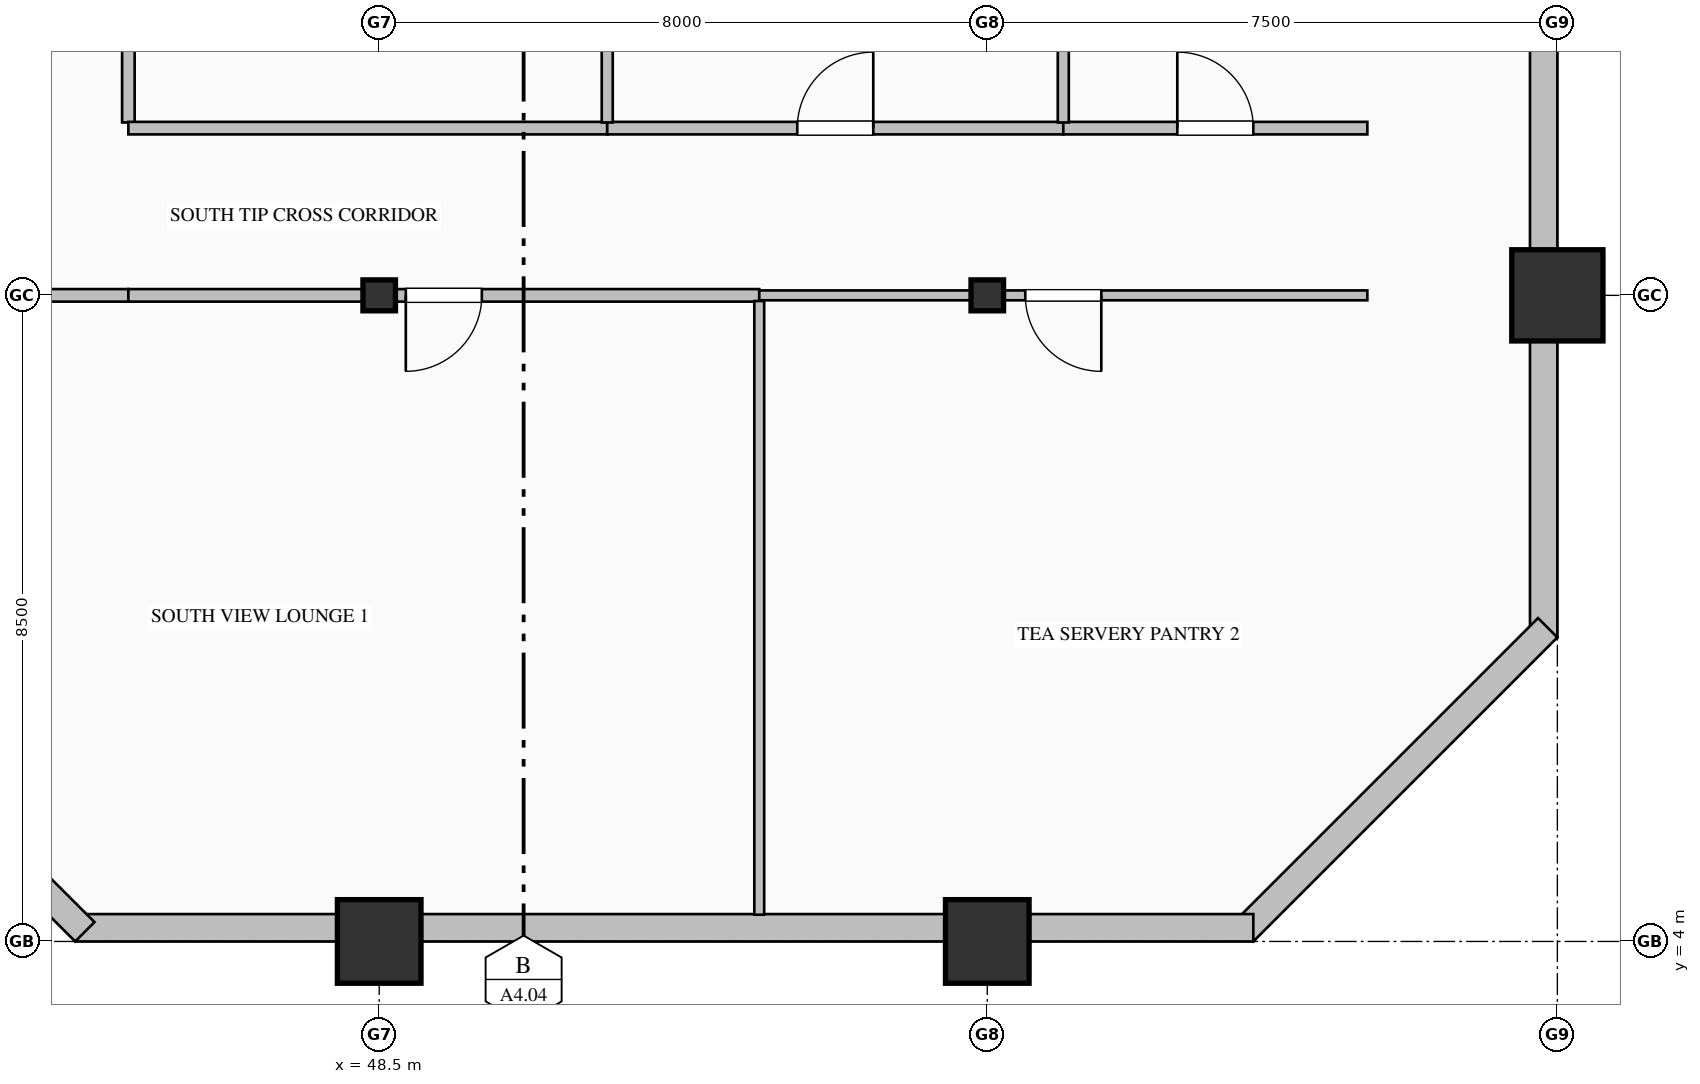
"""IFC4 building model, lengths in metres.
Left out: names, types, materials, properties, quantities, classifications, styles, units other than length and angle.
Written with IfcOpenShell. Run it as: python <this file> out.ifc"""

import sys

from ifc_helpers import new_model, si_unit, direction, frame, frame_2d, origin, origin_2d, place, context, subcontext, project, spatial, rectangle, hollow_rectangle, hollow_circle, i_section, extrude, element, fill, save


model = new_model("IFC4")
c1 = context("Model", 3, precision=1e-05, world=origin(), true_north=direction((0.0, 1.0)))
c2 = subcontext(c1, "Body", "Model", "MODEL_VIEW")
j1 = project(units=[si_unit("LENGTHUNIT", "METRE"), si_unit("PLANEANGLEUNIT", "RADIAN")], contexts=[c1])
p1 = place(None, origin())
s1 = spatial("IfcSite", under=j1, at=p1, CompositionType="ELEMENT")
p2 = place(p1, origin())
s2 = spatial("IfcBuilding", under=s1, at=p2, CompositionType="ELEMENT")
p3 = place(p2, frame((0.0, 0.0, 76.2)))
s3 = spatial("IfcBuildingStorey", under=s2, at=p3, CompositionType="ELEMENT", Elevation=76.2)
p4 = place(p3, frame((48.5, 4.0, 0.0), z_axis=(0.0, 0.0, 1.0), x_axis=(1.0, 0.0, 0.0)))
e1 = element("IfcColumn", 1, at=p4, inside=s3, PredefinedType="COLUMN", context=c2, shape_type="SweptSolid", body=[
    extrude(hollow_rectangle(XDim=1.1, YDim=1.1, WallThickness=0.04, at=origin_2d()), origin(), (0.0, 0.0, 1.0), 4.0),
])
p5 = place(p3, frame((48.5, 12.5, 0.0), z_axis=(0.0, 0.0, 1.0), x_axis=(1.0, 0.0, 0.0)))
e2 = element("IfcColumn", 2, at=p5, inside=s3, PredefinedType="COLUMN", context=c2, shape_type="SweptSolid", body=[
    extrude(i_section(OverallWidth=0.407, OverallDepth=0.428, WebThickness=0.02, FlangeThickness=0.035, FilletRadius=0.022, at=origin_2d()), origin(), (0.0, 0.0, 1.0), 4.0),
])
p6 = place(p3, frame((56.5, 4.0, 0.0), z_axis=(0.0, 0.0, 1.0), x_axis=(1.0, 0.0, 0.0)))
e3 = element("IfcColumn", 3, at=p6, inside=s3, PredefinedType="COLUMN", context=c2, shape_type="SweptSolid", body=[
    extrude(hollow_rectangle(XDim=1.1, YDim=1.1, WallThickness=0.04, at=origin_2d()), origin(), (0.0, 0.0, 1.0), 4.0),
])
p7 = place(p3, frame((56.5, 12.5, 0.0), z_axis=(0.0, 0.0, 1.0), x_axis=(1.0, 0.0, 0.0)))
e4 = element("IfcColumn", 4, at=p7, inside=s3, PredefinedType="COLUMN", context=c2, shape_type="SweptSolid", body=[
    extrude(i_section(OverallWidth=0.407, OverallDepth=0.428, WebThickness=0.02, FlangeThickness=0.035, FilletRadius=0.022, at=origin_2d()), origin(), (0.0, 0.0, 1.0), 4.0),
])
p8 = place(p3, frame((64.0, 12.5, 0.0), z_axis=(0.0, 0.0, 1.0), x_axis=(1.0, 0.0, 0.0)))
e5 = element("IfcColumn", 5, at=p8, inside=s3, PredefinedType="COLUMN", context=c2, shape_type="SweptSolid", body=[
    extrude(hollow_circle(Radius=0.6, WallThickness=0.04, at=origin_2d()), origin(), (0.0, 0.0, 1.0), 4.0),
])
p9 = place(p3, frame((63.82, 36.05, 0.0), z_axis=(0.0, 0.0, 1.0), x_axis=(0.0, -1.0, 0.0)))
e6 = element("IfcWall", 6, at=p9, inside=s3, PredefinedType="SOLIDWALL", context=c2, shape_type="SweptSolid", body=[
    extrude(rectangle(XDim=28.05, YDim=0.36, at=frame_2d((14.025, 0.0))), origin(), (0.0, 0.0, 1.0), 3.25),
])
p10 = place(p9, frame((2.7, 0.0, 0.85)))
e7 = element("IfcOpeningElement", 7, at=p10, cuts=e6, PredefinedType="OPENING", context=c2, shape_type="SweptSolid", body=[
    extrude(rectangle(XDim=1.8, YDim=2.05, at=frame_2d((0.9, 1.025))), frame((0.0, 0.19, 0.0), z_axis=(0.0, -1.0, 0.0), x_axis=(1.0, 0.0, 0.0)), (0.0, 0.0, 1.0), 0.38),
])
p11 = place(p9, frame((9.6, 0.0, 0.8)))
e8 = element("IfcOpeningElement", 8, at=p11, cuts=e6, PredefinedType="OPENING", context=c2, shape_type="SweptSolid", body=[
    extrude(rectangle(XDim=2.4, YDim=2.15, at=frame_2d((1.2, 1.075))), frame((0.0, 0.19, 0.0), z_axis=(0.0, -1.0, 0.0), x_axis=(1.0, 0.0, 0.0)), (0.0, 0.0, 1.0), 0.38),
])
p12 = place(p9, frame((13.5, 0.0, 0.85)))
e9 = element("IfcOpeningElement", 9, at=p12, cuts=e6, PredefinedType="OPENING", context=c2, shape_type="SweptSolid", body=[
    extrude(rectangle(XDim=1.8, YDim=2.05, at=frame_2d((0.9, 1.025))), frame((0.0, 0.19, 0.0), z_axis=(0.0, -1.0, 0.0), x_axis=(1.0, 0.0, 0.0)), (0.0, 0.0, 1.0), 0.38),
])
p13 = place(p3, frame((63.873, 8.127, 0.0), z_axis=(0.0, 0.0, 1.0), x_axis=(-0.707106781187, -0.707106781187, 0.0)))
e10 = element("IfcWall", 10, at=p13, inside=s3, PredefinedType="SOLIDWALL", context=c2, shape_type="SweptSolid", body=[
    extrude(rectangle(XDim=5.657, YDim=0.36, at=frame_2d((2.828, 0.0))), origin(), (0.0, 0.0, 1.0), 3.75),
])
p14 = place(p3, frame((60.0, 4.18, 0.0), z_axis=(0.0, 0.0, 1.0), x_axis=(-1.0, 0.0, 0.0)))
e11 = element("IfcWall", 11, at=p14, inside=s3, PredefinedType="SOLIDWALL", context=c2, shape_type="SweptSolid", body=[
    extrude(rectangle(XDim=15.5, YDim=0.36, at=frame_2d((7.75, 0.0))), origin(), (0.0, 0.0, 1.0), 3.25),
])
p15 = place(p3, frame((44.627, 4.127, 0.0), z_axis=(0.0, 0.0, 1.0), x_axis=(-0.707106781187, 0.707106781187, 0.0)))
e12 = element("IfcWall", 12, at=p15, inside=s3, PredefinedType="SOLIDWALL", context=c2, shape_type="SweptSolid", body=[
    extrude(rectangle(XDim=5.657, YDim=0.36, at=frame_2d((2.828, 0.0))), origin(), (0.0, 0.0, 1.0), 3.75),
])
p16 = place(p3, frame((45.2, 31.525, 0.0), z_axis=(0.0, 0.0, 1.0), x_axis=(0.0, -1.0, 0.0)))
e13 = element("IfcWall", 13, at=p16, inside=s3, PredefinedType="PARTITIONING", context=c2, shape_type="SweptSolid", body=[
    extrude(rectangle(XDim=16.751, YDim=0.165, at=frame_2d((8.375, 0.0))), origin(), (0.0, 0.0, 1.0), 3.75),
])
p17 = place(p16, frame((7.875, 0.0, 0.0)))
e14 = element("IfcOpeningElement", 14, at=p17, cuts=e13, PredefinedType="OPENING", context=c2, shape_type="SweptSolid", body=[
    extrude(rectangle(XDim=1.0, YDim=2.15, at=frame_2d((0.5, 1.075))), frame((0.0, 0.093, 0.0), z_axis=(0.0, -1.0, 0.0), x_axis=(1.0, 0.0, 0.0)), (0.0, 0.0, 1.0), 0.185),
])
p18 = place(p3, frame((45.2, 12.5, 0.0), z_axis=(0.0, 0.0, 1.0), x_axis=(-1.0, 0.0, 0.0)))
e15 = element("IfcWall", 15, at=p18, inside=s3, PredefinedType="PARTITIONING", context=c2, shape_type="SweptSolid", body=[
    extrude(rectangle(XDim=2.2, YDim=0.165, at=frame_2d((1.1, 0.0))), origin(), (0.0, 0.0, 1.0), 3.042),
])
p19 = place(p3, frame((45.2, 14.7, 0.0), z_axis=(0.0, 0.0, 1.0), x_axis=(1.0, 0.0, 0.0)))
e16 = element("IfcWall", 16, at=p19, inside=s3, PredefinedType="PARTITIONING", context=c2, shape_type="SweptSolid", body=[
    extrude(rectangle(XDim=6.3, YDim=0.165, at=frame_2d((3.15, 0.0))), origin(), (0.0, 0.0, 1.0), 3.75),
])
p20 = place(p3, frame((51.5, 14.7, 0.0), z_axis=(0.0, 0.0, 1.0), x_axis=(1.0, 0.0, 0.0)))
e17 = element("IfcWall", 17, at=p20, inside=s3, PredefinedType="PARTITIONING", context=c2, shape_type="SweptSolid", body=[
    extrude(rectangle(XDim=6.0, YDim=0.165, at=frame_2d((3.0, 0.0))), origin(), (0.0, 0.0, 1.0), 3.75),
])
p21 = place(p20, frame((2.5, 0.0, 0.0)))
e18 = element("IfcOpeningElement", 18, at=p21, cuts=e17, PredefinedType="OPENING", context=c2, shape_type="SweptSolid", body=[
    extrude(rectangle(XDim=1.0, YDim=2.15, at=frame_2d((0.5, 1.075))), frame((0.0, 0.093, 0.0), z_axis=(0.0, -1.0, 0.0), x_axis=(1.0, 0.0, 0.0)), (0.0, 0.0, 1.0), 0.185),
])
p22 = place(p3, frame((57.5, 14.7, 0.0), z_axis=(0.0, 0.0, 1.0), x_axis=(1.0, 0.0, 0.0)))
e19 = element("IfcWall", 19, at=p22, inside=s3, PredefinedType="PARTITIONING", context=c2, shape_type="SweptSolid", body=[
    extrude(rectangle(XDim=4.0, YDim=0.165, at=frame_2d((2.0, 0.0))), origin(), (0.0, 0.0, 1.0), 3.75),
])
p23 = place(p22, frame((1.5, 0.0, 0.0)))
e20 = element("IfcOpeningElement", 20, at=p23, cuts=e19, PredefinedType="OPENING", context=c2, shape_type="SweptSolid", body=[
    extrude(rectangle(XDim=1.0, YDim=2.15, at=frame_2d((0.5, 1.075))), frame((0.0, 0.093, 0.0), z_axis=(0.0, -1.0, 0.0), x_axis=(1.0, 0.0, 0.0)), (0.0, 0.0, 1.0), 0.185),
])
p24 = place(p3, frame((53.5, 12.5, 0.0), z_axis=(0.0, 0.0, 1.0), x_axis=(-1.0, 0.0, 0.0)))
e21 = element("IfcWall", 21, at=p24, inside=s3, PredefinedType="PARTITIONING", context=c2, shape_type="SweptSolid", body=[
    extrude(rectangle(XDim=8.3, YDim=0.165, at=frame_2d((4.15, 0.0))), origin(), (0.0, 0.0, 1.0), 3.042),
])
p25 = place(p24, frame((3.65, 0.0, 0.0)))
e22 = element("IfcOpeningElement", 22, at=p25, cuts=e21, PredefinedType="OPENING", context=c2, shape_type="SweptSolid", body=[
    extrude(rectangle(XDim=1.0, YDim=2.15, at=frame_2d((0.5, 1.075))), frame((0.0, 0.093, 0.0), z_axis=(0.0, -1.0, 0.0), x_axis=(1.0, 0.0, 0.0)), (0.0, 0.0, 1.0), 0.185),
])
p26 = place(p3, frame((61.5, 12.5, 0.0), z_axis=(0.0, 0.0, 1.0), x_axis=(-1.0, 0.0, 0.0)))
e23 = element("IfcWall", 23, at=p26, inside=s3, PredefinedType="PARTITIONING", context=c2, shape_type="SweptSolid", body=[
    extrude(rectangle(XDim=8.0, YDim=0.13, at=frame_2d((4.0, 0.0))), origin(), (0.0, 0.0, 1.0), 3.042),
])
p27 = place(p26, frame((3.5, 0.0, 0.0)))
e24 = element("IfcOpeningElement", 24, at=p27, cuts=e23, PredefinedType="OPENING", context=c2, shape_type="SweptSolid", body=[
    extrude(rectangle(XDim=1.0, YDim=2.15, at=frame_2d((0.5, 1.075))), frame((0.0, 0.075, 0.0), z_axis=(0.0, -1.0, 0.0), x_axis=(1.0, 0.0, 0.0)), (0.0, 0.0, 1.0), 0.15),
])
p28 = place(p3, frame((51.5, 31.525, 0.0), z_axis=(0.0, 0.0, 1.0), x_axis=(0.0, -1.0, 0.0)))
e25 = element("IfcWall", 25, at=p28, inside=s3, PredefinedType="PARTITIONING", context=c2, shape_type="SweptSolid", body=[
    extrude(rectangle(XDim=16.751, YDim=0.145, at=frame_2d((8.375, 0.0))), origin(), (0.0, 0.0, 1.0), 3.75),
])
p29 = place(p3, frame((57.5, 36.0, 0.0), z_axis=(0.0, 0.0, 1.0), x_axis=(0.0, -1.0, 0.0)))
e26 = element("IfcWall", 26, at=p29, inside=s3, PredefinedType="PARTITIONING", context=c2, shape_type="SweptSolid", body=[
    extrude(rectangle(XDim=21.226, YDim=0.145, at=frame_2d((10.613, 0.0))), origin(), (0.0, 0.0, 1.0), 3.75),
])
p30 = place(p3, frame((53.5, 12.426, 0.0), z_axis=(0.0, 0.0, 1.0), x_axis=(0.0, -1.0, 0.0)))
e27 = element("IfcWall", 27, at=p30, inside=s3, PredefinedType="PARTITIONING", context=c2, shape_type="SweptSolid", body=[
    extrude(rectangle(XDim=8.073, YDim=0.13, at=frame_2d((4.037, 0.0))), origin(), (0.0, 0.0, 1.0), 3.75),
])
p31 = place(p21, origin())
e28 = element("IfcDoor", 28, at=p31, inside=s3, OperationType="SINGLE_SWING_RIGHT", PredefinedType="DOOR", context=c2, shape_type="SweptSolid", body=[
    extrude(rectangle(XDim=1.0, YDim=2.15, at=frame_2d((0.5, 1.075))), frame((0.0, 0.025, 0.0), z_axis=(0.0, -1.0, 0.0), x_axis=(1.0, 0.0, 0.0)), (0.0, 0.0, 1.0), 0.05),
])
fill(e18, e28)
p32 = place(p23, origin())
e29 = element("IfcDoor", 29, at=p32, inside=s3, OperationType="SINGLE_SWING_LEFT", PredefinedType="DOOR", context=c2, shape_type="SweptSolid", body=[
    extrude(rectangle(XDim=1.0, YDim=2.15, at=frame_2d((0.5, 1.075))), frame((0.0, 0.025, 0.0), z_axis=(0.0, -1.0, 0.0), x_axis=(1.0, 0.0, 0.0)), (0.0, 0.0, 1.0), 0.05),
])
fill(e20, e29)
p33 = place(p25, origin())
e30 = element("IfcDoor", 30, at=p33, inside=s3, OperationType="SINGLE_SWING_RIGHT", PredefinedType="DOOR", context=c2, shape_type="SweptSolid", body=[
    extrude(rectangle(XDim=1.0, YDim=2.15, at=frame_2d((0.5, 1.075))), frame((0.0, 0.025, 0.0), z_axis=(0.0, -1.0, 0.0), x_axis=(1.0, 0.0, 0.0)), (0.0, 0.0, 1.0), 0.05),
])
fill(e22, e30)
p34 = place(p27, origin())
e31 = element("IfcDoor", 31, at=p34, inside=s3, OperationType="SINGLE_SWING_LEFT", PredefinedType="DOOR", context=c2, shape_type="SweptSolid", body=[
    extrude(rectangle(XDim=1.0, YDim=2.15, at=frame_2d((0.5, 1.075))), frame((0.0, 0.025, 0.0), z_axis=(0.0, -1.0, 0.0), x_axis=(1.0, 0.0, 0.0)), (0.0, 0.0, 1.0), 0.05),
])
fill(e24, e31)
save(model, sys.argv[1])
